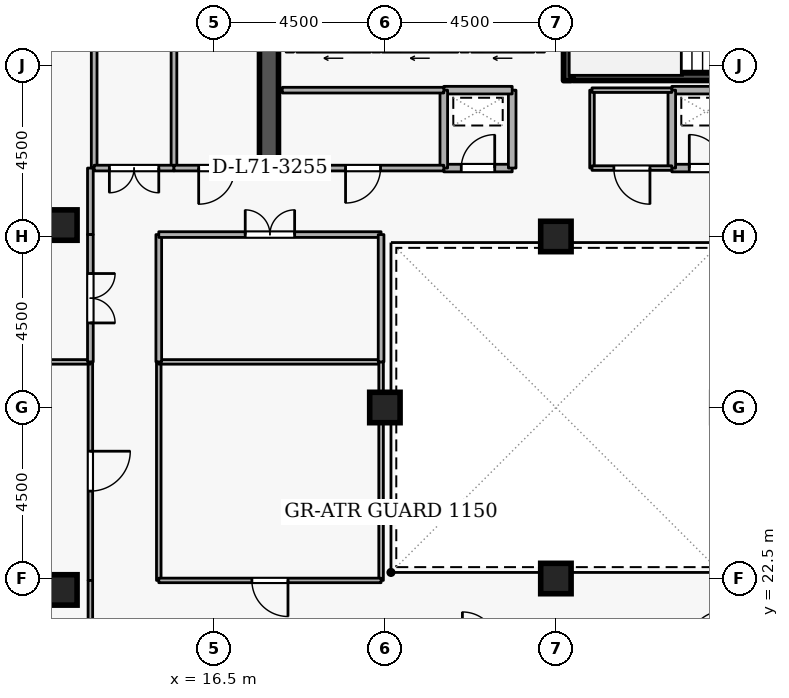
"""IFC4 building model, lengths in metres.
Left out: names, types, materials, properties, quantities, classifications, styles, units other than length and angle.
Written with IfcOpenShell. Run it as: python <this file> out.ifc"""

import sys

from ifc_helpers import new_model, si_unit, direction, frame, frame_2d, origin, origin_2d, place, context, subcontext, project, spatial, rectangle, extrude, element, fill, save


model = new_model("IFC4")
c1 = context("Model", 3, precision=1e-05, world=origin(), true_north=direction((0.0, 1.0)))
c2 = subcontext(c1, "Body", "Model", "MODEL_VIEW")
j1 = project(units=[si_unit("LENGTHUNIT", "METRE"), si_unit("PLANEANGLEUNIT", "RADIAN")], contexts=[c1])
p1 = place(None, origin())
s1 = spatial("IfcSite", under=j1, at=p1, CompositionType="ELEMENT")
p2 = place(p1, origin())
s2 = spatial("IfcBuilding", under=s1, at=p2, CompositionType="ELEMENT")
p3 = place(p2, frame((0.0, 0.0, 265.5)))
s3 = spatial("IfcBuildingStorey", under=s2, at=p3, CompositionType="ELEMENT", Elevation=265.5)
p4 = place(p3, frame((17.95, 33.1, 0.0), z_axis=(0.0, 0.0, 1.0), x_axis=(0.0, 1.0, 0.0)))
e1 = element("IfcWall", 1, at=p4, inside=s3, PredefinedType="SHEAR", context=c2, shape_type="SweptSolid", body=[
    extrude(rectangle(XDim=5.8, YDim=0.5, at=frame_2d((2.9, 0.0))), origin(), (0.0, 0.0, 1.0), 3.6),
])
for number, where, z_axis, x_axis in (
    (2, (12.5, 22.2, 0.0), (0.0, 0.0, 1.0), (1.0, 0.0, 0.0)),
    (3, (12.5, 31.8, 0.0), (0.0, 0.0, 1.0), (1.0, 0.0, 0.0)),
    (4, (25.5, 22.5, 0.0), (0.0, 0.0, 1.0), (1.0, 0.0, 0.0)),
    (5, (25.5, 31.5, 0.0), (0.0, 0.0, 1.0), (1.0, 0.0, 0.0)),
    (6, (21.0, 27.0, 0.0), (0.0, 0.0, 1.0), (1.0, 0.0, 0.0)),
):
    element("IfcColumn", number, at=place(p3, frame(where, z_axis=z_axis, x_axis=x_axis)), inside=s3, PredefinedType="COLUMN", context=c2, shape_type="SweptSolid", body=[
        extrude(rectangle(XDim=0.8, YDim=0.8, at=origin_2d()), origin(), (0.0, 0.0, 1.0), 3.6),
    ])
p5 = place(p3, frame((24.92, 36.45, 0.0), z_axis=(0.0, 0.0, 1.0), x_axis=(-1.0, 0.0, 0.0)))
e7 = element("IfcWall", 7, at=p5, inside=s3, PredefinedType="STANDARD", context=c2, shape_type="SweptSolid", body=[
    extrude(rectangle(XDim=1.64, YDim=0.2, at=frame_2d((0.82, 0.0))), origin(), (0.0, 0.0, 1.0), 3.34),
])
p6 = place(p5, frame((0.31, 0.0, 0.0)))
e8 = element("IfcOpeningElement", 8, at=p6, cuts=e7, PredefinedType="OPENING", context=c2, shape_type="SweptSolid", body=[
    extrude(rectangle(XDim=1.02, YDim=2.06, at=frame_2d((0.51, 1.03))), frame((0.0, 0.11, 0.0), z_axis=(0.0, -1.0, 0.0), x_axis=(1.0, 0.0, 0.0)), (0.0, 0.0, 1.0), 0.22),
])
p7 = place(p3, frame((22.92, 36.45, 0.0), z_axis=(0.0, 0.0, 1.0), x_axis=(-1.0, 0.0, 0.0)))
e9 = element("IfcWall", 9, at=p7, inside=s3, PredefinedType="STANDARD", context=c2, shape_type="SweptSolid", body=[
    extrude(rectangle(XDim=1.99, YDim=0.2, at=frame_2d((0.995, 0.0))), origin(), (0.0, 0.0, 1.0), 3.34),
])
p8 = place(p7, frame((0.485, 0.0, 0.0)))
e10 = element("IfcOpeningElement", 10, at=p8, cuts=e9, PredefinedType="OPENING", context=c2, shape_type="SweptSolid", body=[
    extrude(rectangle(XDim=1.02, YDim=2.06, at=frame_2d((0.51, 1.03))), frame((0.0, 0.11, 0.0), z_axis=(0.0, -1.0, 0.0), x_axis=(1.0, 0.0, 0.0)), (0.0, 0.0, 1.0), 0.22),
])
p9 = place(p3, frame((20.62, 36.45, 0.0), z_axis=(0.0, 0.0, 1.0), x_axis=(-1.0, 0.0, 0.0)))
e11 = element("IfcWall", 11, at=p9, inside=s3, PredefinedType="STANDARD", context=c2, shape_type="SweptSolid", body=[
    extrude(rectangle(XDim=1.94, YDim=0.2, at=frame_2d((0.97, 0.0))), origin(), (0.0, 0.0, 1.0), 3.34),
])
p10 = place(p9, frame((0.46, 0.0, 0.0)))
e12 = element("IfcOpeningElement", 12, at=p10, cuts=e11, PredefinedType="OPENING", context=c2, shape_type="SweptSolid", body=[
    extrude(rectangle(XDim=1.02, YDim=2.06, at=frame_2d((0.51, 1.03))), frame((0.0, 0.11, 0.0), z_axis=(0.0, -1.0, 0.0), x_axis=(1.0, 0.0, 0.0)), (0.0, 0.0, 1.0), 0.22),
])
p11 = place(p3, frame((25.8, 35.6, 0.0), z_axis=(0.0, 0.0, 1.0), x_axis=(0.0, 1.0, 0.0)))
e13 = element("IfcWall", 13, at=p11, inside=s3, PredefinedType="SHEAR", context=c2, shape_type="SweptSolid", body=[
    extrude(rectangle(XDim=3.35, YDim=0.2, at=frame_2d((1.675, 0.0))), origin(), (0.0, 0.0, 1.0), 3.6),
])
p12 = place(p3, frame((25.95, 35.703, 0.0), z_axis=(0.0, 0.0, 1.0), x_axis=(1.0, 0.0, 0.0)))
e14 = element("IfcWall", 14, at=p12, inside=s3, PredefinedType="SHEAR", context=c2, shape_type="SweptSolid", body=[
    extrude(rectangle(XDim=7.1, YDim=0.2, at=frame_2d((3.55, 0.0))), origin(), (0.0, 0.0, 1.0), 3.6),
])
p13 = place(p3, frame((22.55, 33.3, 0.0), z_axis=(0.0, 0.0, 1.0), x_axis=(1.0, 0.0, 0.0)))
e15 = element("IfcWall", 15, at=p13, inside=s3, PredefinedType="STANDARD", context=c2, shape_type="SweptSolid", body=[
    extrude(rectangle(XDim=1.8, YDim=0.2, at=frame_2d((0.9, 0.0))), origin(), (0.0, 0.0, 1.0), 3.34),
])
p14 = place(p13, frame((0.46, 0.0, 0.0)))
e16 = element("IfcOpeningElement", 16, at=p14, cuts=e15, PredefinedType="OPENING", context=c2, shape_type="SweptSolid", body=[
    extrude(rectangle(XDim=0.88, YDim=2.04, at=frame_2d((0.44, 1.02))), frame((0.0, 0.11, 0.0), z_axis=(0.0, -1.0, 0.0), x_axis=(1.0, 0.0, 0.0)), (0.0, 0.0, 1.0), 0.22),
])
p15 = place(p3, frame((24.35, 33.3, 0.0), z_axis=(0.0, 0.0, 1.0), x_axis=(0.0, 1.0, 0.0)))
e17 = element("IfcWall", 17, at=p15, inside=s3, PredefinedType="STANDARD", context=c2, shape_type="SweptSolid", body=[
    extrude(rectangle(XDim=2.05, YDim=0.2, at=frame_2d((1.025, 0.0))), origin(), (0.0, 0.0, 1.0), 3.34),
])
p16 = place(p3, frame((24.35, 35.35, 0.0), z_axis=(0.0, 0.0, 1.0), x_axis=(-1.0, 0.0, 0.0)))
e18 = element("IfcWall", 18, at=p16, inside=s3, PredefinedType="STANDARD", context=c2, shape_type="SweptSolid", body=[
    extrude(rectangle(XDim=1.8, YDim=0.2, at=frame_2d((0.9, 0.0))), origin(), (0.0, 0.0, 1.0), 3.34),
])
p17 = place(p3, frame((22.55, 35.35, 0.0), z_axis=(0.0, 0.0, 1.0), x_axis=(0.0, -1.0, 0.0)))
e19 = element("IfcWall", 19, at=p17, inside=s3, PredefinedType="STANDARD", context=c2, shape_type="SweptSolid", body=[
    extrude(rectangle(XDim=2.05, YDim=0.2, at=frame_2d((1.025, 0.0))), origin(), (0.0, 0.0, 1.0), 3.34),
])
p18 = place(p3, frame((28.55, 33.3, 0.0), z_axis=(0.0, 0.0, 1.0), x_axis=(1.0, 0.0, 0.0)))
e20 = element("IfcWall", 20, at=p18, inside=s3, PredefinedType="STANDARD", context=c2, shape_type="SweptSolid", body=[
    extrude(rectangle(XDim=1.8, YDim=0.2, at=frame_2d((0.9, 0.0))), origin(), (0.0, 0.0, 1.0), 3.34),
])
p19 = place(p18, frame((0.46, 0.0, 0.0)))
e21 = element("IfcOpeningElement", 21, at=p19, cuts=e20, PredefinedType="OPENING", context=c2, shape_type="SweptSolid", body=[
    extrude(rectangle(XDim=0.88, YDim=2.04, at=frame_2d((0.44, 1.02))), frame((0.0, 0.11, 0.0), z_axis=(0.0, -1.0, 0.0), x_axis=(1.0, 0.0, 0.0)), (0.0, 0.0, 1.0), 0.22),
])
p20 = place(p3, frame((30.35, 35.35, 0.0), z_axis=(0.0, 0.0, 1.0), x_axis=(-1.0, 0.0, 0.0)))
e22 = element("IfcWall", 22, at=p20, inside=s3, PredefinedType="STANDARD", context=c2, shape_type="SweptSolid", body=[
    extrude(rectangle(XDim=1.8, YDim=0.2, at=frame_2d((0.9, 0.0))), origin(), (0.0, 0.0, 1.0), 3.34),
])
p21 = place(p3, frame((28.55, 35.35, 0.0), z_axis=(0.0, 0.0, 1.0), x_axis=(0.0, -1.0, 0.0)))
e23 = element("IfcWall", 23, at=p21, inside=s3, PredefinedType="STANDARD", context=c2, shape_type="SweptSolid", body=[
    extrude(rectangle(XDim=2.05, YDim=0.2, at=frame_2d((1.025, 0.0))), origin(), (0.0, 0.0, 1.0), 3.34),
])
p22 = place(p3, frame((18.3, 35.35, 0.0), z_axis=(0.0, 0.0, 1.0), x_axis=(1.0, 0.0, 0.0)))
e24 = element("IfcWall", 24, at=p22, inside=s3, PredefinedType="PARTITIONING", context=c2, shape_type="SweptSolid", body=[
    extrude(rectangle(XDim=4.25, YDim=0.15, at=frame_2d((2.125, 0.0))), origin(), (0.0, 0.0, 1.0), 3.34),
])
p23 = place(p3, frame((22.55, 33.3, 0.0), z_axis=(0.0, 0.0, 1.0), x_axis=(-1.0, 0.0, 0.0)))
e25 = element("IfcWall", 25, at=p23, inside=s3, PredefinedType="PARTITIONING", context=c2, shape_type="SweptSolid", body=[
    extrude(rectangle(XDim=4.25, YDim=0.15, at=frame_2d((2.125, 0.0))), origin(), (0.0, 0.0, 1.0), 3.34),
])
p24 = place(p23, frame((1.665, 0.0, 0.0)))
e26 = element("IfcOpeningElement", 26, at=p24, cuts=e25, PredefinedType="OPENING", context=c2, shape_type="SweptSolid", body=[
    extrude(rectangle(XDim=0.92, YDim=2.08, at=frame_2d((0.46, 1.04))), frame((0.0, 0.085, 0.0), z_axis=(0.0, -1.0, 0.0), x_axis=(1.0, 0.0, 0.0)), (0.0, 0.0, 1.0), 0.17),
])
p25 = place(p3, frame((26.45, 33.3, 0.0), z_axis=(0.0, 0.0, 1.0), x_axis=(0.0, 1.0, 0.0)))
e27 = element("IfcWall", 27, at=p25, inside=s3, PredefinedType="PARTITIONING", context=c2, shape_type="SweptSolid", body=[
    extrude(rectangle(XDim=2.05, YDim=0.12, at=frame_2d((1.025, 0.0))), origin(), (0.0, 0.0, 1.0), 3.34),
])
p26 = place(p3, frame((26.45, 35.35, 0.0), z_axis=(0.0, 0.0, 1.0), x_axis=(1.0, 0.0, 0.0)))
e28 = element("IfcWall", 28, at=p26, inside=s3, PredefinedType="PARTITIONING", context=c2, shape_type="SweptSolid", body=[
    extrude(rectangle(XDim=2.1, YDim=0.12, at=frame_2d((1.05, 0.0))), origin(), (0.0, 0.0, 1.0), 3.34),
])
p27 = place(p3, frame((28.55, 33.3, 0.0), z_axis=(0.0, 0.0, 1.0), x_axis=(-1.0, 0.0, 0.0)))
e29 = element("IfcWall", 29, at=p27, inside=s3, PredefinedType="PARTITIONING", context=c2, shape_type="SweptSolid", body=[
    extrude(rectangle(XDim=2.1, YDim=0.12, at=frame_2d((1.05, 0.0))), origin(), (0.0, 0.0, 1.0), 3.34),
])
p28 = place(p27, frame((0.575, 0.0, 0.0)))
e30 = element("IfcOpeningElement", 30, at=p28, cuts=e29, PredefinedType="OPENING", context=c2, shape_type="SweptSolid", body=[
    extrude(rectangle(XDim=0.95, YDim=2.1, at=frame_2d((0.475, 1.05))), frame((0.0, 0.07, 0.0), z_axis=(0.0, -1.0, 0.0), x_axis=(1.0, 0.0, 0.0)), (0.0, 0.0, 1.0), 0.14),
])
for number, where, z_axis, x_axis in (
    (31, (13.35, 33.3, 0.0), (0.0, 0.0, 1.0), (0.0, 1.0, 0.0)),
    (32, (15.45, 44.72, 0.0), (0.0, 0.0, 1.0), (0.0, -1.0, 0.0)),
):
    element("IfcWall", number, at=place(p3, frame(where, z_axis=z_axis, x_axis=x_axis)), inside=s3, PredefinedType="PARTITIONING", context=c2, shape_type="SweptSolid", body=[
        extrude(rectangle(XDim=11.42, YDim=0.15, at=frame_2d((5.71, 0.0))), origin(), (0.0, 0.0, 1.0), 3.34),
    ])
p29 = place(p3, frame((15.45, 33.3, 0.0), z_axis=(0.0, 0.0, 1.0), x_axis=(-1.0, 0.0, 0.0)))
e33 = element("IfcWall", 33, at=p29, inside=s3, PredefinedType="PARTITIONING", context=c2, shape_type="SweptSolid", body=[
    extrude(rectangle(XDim=2.1, YDim=0.15, at=frame_2d((1.05, 0.0))), origin(), (0.0, 0.0, 1.0), 3.34),
])
p30 = place(p29, frame((0.4, 0.0, 0.0)))
e34 = element("IfcOpeningElement", 34, at=p30, cuts=e33, PredefinedType="OPENING", context=c2, shape_type="SweptSolid", body=[
    extrude(rectangle(XDim=1.3, YDim=2.12, at=frame_2d((0.65, 1.06))), frame((0.0, 0.085, 0.0), z_axis=(0.0, -1.0, 0.0), x_axis=(1.0, 0.0, 0.0)), (0.0, 0.0, 1.0), 0.17),
])
p31 = place(p3, frame((17.7, 33.3, 0.0), z_axis=(0.0, 0.0, 1.0), x_axis=(-1.0, 0.0, 0.0)))
e35 = element("IfcWall", 35, at=p31, inside=s3, PredefinedType="PARTITIONING", context=c2, shape_type="SweptSolid", body=[
    extrude(rectangle(XDim=2.25, YDim=0.15, at=frame_2d((1.125, 0.0))), origin(), (0.0, 0.0, 1.0), 3.34),
])
p32 = place(p31, frame((0.65, 0.0, 0.0)))
e36 = element("IfcOpeningElement", 36, at=p32, cuts=e35, PredefinedType="OPENING", context=c2, shape_type="SweptSolid", body=[
    extrude(rectangle(XDim=0.95, YDim=2.1, at=frame_2d((0.475, 1.05))), frame((0.0, 0.085, 0.0), z_axis=(0.0, -1.0, 0.0), x_axis=(1.0, 0.0, 0.0)), (0.0, 0.0, 1.0), 0.17),
])
p33 = place(p3, frame((13.25, 28.2, 0.0), z_axis=(0.0, 0.0, 1.0), x_axis=(0.0, -1.0, 0.0)))
e37 = element("IfcWall", 37, at=p33, inside=s3, PredefinedType="PARTITIONING", context=c2, shape_type="SweptSolid", body=[
    extrude(rectangle(XDim=5.75, YDim=0.12, at=frame_2d((2.875, 0.0))), origin(), (0.0, 0.0, 1.0), 3.34),
])
p34 = place(p33, frame((2.35, 0.0, 0.0)))
e38 = element("IfcOpeningElement", 38, at=p34, cuts=e37, PredefinedType="OPENING", context=c2, shape_type="SweptSolid", body=[
    extrude(rectangle(XDim=1.05, YDim=2.1, at=frame_2d((0.525, 1.05))), frame((0.0, 0.07, 0.0), z_axis=(0.0, -1.0, 0.0), x_axis=(1.0, 0.0, 0.0)), (0.0, 0.0, 1.0), 0.14),
])
p35 = place(p3, frame((13.25, 22.45, 0.0), z_axis=(0.0, 0.0, 1.0), x_axis=(0.0, -1.0, 0.0)))
e39 = element("IfcWall", 39, at=p35, inside=s3, PredefinedType="PARTITIONING", context=c2, shape_type="SweptSolid", body=[
    extrude(rectangle(XDim=1.75, YDim=0.12, at=frame_2d((0.875, 0.0))), origin(), (0.0, 0.0, 1.0), 3.34),
])
p36 = place(p3, frame((7.78, 28.2, 0.0), z_axis=(0.0, 0.0, 1.0), x_axis=(1.0, 0.0, 0.0)))
e40 = element("IfcWall", 40, at=p36, inside=s3, PredefinedType="PARTITIONING", context=c2, shape_type="SweptSolid", body=[
    extrude(rectangle(XDim=5.47, YDim=0.12, at=frame_2d((2.735, 0.0))), origin(), (0.0, 0.0, 1.0), 3.34),
])
p37 = place(p3, frame((13.25, 33.3, 0.0), z_axis=(0.0, 0.0, 1.0), x_axis=(0.0, -1.0, 0.0)))
e41 = element("IfcWall", 41, at=p37, inside=s3, PredefinedType="PARTITIONING", context=c2, shape_type="SweptSolid", body=[
    extrude(rectangle(XDim=1.75, YDim=0.15, at=frame_2d((0.875, 0.0))), origin(), (0.0, 0.0, 1.0), 3.34),
])
p38 = place(p3, frame((13.25, 31.55, 0.0), z_axis=(0.0, 0.0, 1.0), x_axis=(0.0, -1.0, 0.0)))
e42 = element("IfcWall", 42, at=p38, inside=s3, PredefinedType="PARTITIONING", context=c2, shape_type="SweptSolid", body=[
    extrude(rectangle(XDim=3.35, YDim=0.15, at=frame_2d((1.675, 0.0))), origin(), (0.0, 0.0, 1.0), 3.34),
])
p39 = place(p38, frame((1.025, 0.0, 0.0)))
e43 = element("IfcOpeningElement", 43, at=p39, cuts=e42, PredefinedType="OPENING", context=c2, shape_type="SweptSolid", body=[
    extrude(rectangle(XDim=1.3, YDim=2.12, at=frame_2d((0.65, 1.06))), frame((0.0, 0.085, 0.0), z_axis=(0.0, -1.0, 0.0), x_axis=(1.0, 0.0, 0.0)), (0.0, 0.0, 1.0), 0.17),
])
p40 = place(p3, frame((15.05, 22.45, 0.0), z_axis=(0.0, 0.0, 1.0), x_axis=(0.0, 1.0, 0.0)))
e44 = element("IfcWall", 44, at=p40, inside=s3, PredefinedType="PARTITIONING", context=c2, shape_type="SweptSolid", body=[
    extrude(rectangle(XDim=5.75, YDim=0.12, at=frame_2d((2.875, 0.0))), origin(), (0.0, 0.0, 1.0), 3.34),
])
p41 = place(p3, frame((15.05, 28.2, 0.0), z_axis=(0.0, 0.0, 1.0), x_axis=(1.0, 0.0, 0.0)))
e45 = element("IfcWall", 45, at=p41, inside=s3, PredefinedType="PARTITIONING", context=c2, shape_type="SweptSolid", body=[
    extrude(rectangle(XDim=5.85, YDim=0.12, at=frame_2d((2.925, 0.0))), origin(), (0.0, 0.0, 1.0), 3.34),
])
p42 = place(p3, frame((20.9, 28.2, 0.0), z_axis=(0.0, 0.0, 1.0), x_axis=(0.0, -1.0, 0.0)))
e46 = element("IfcWall", 46, at=p42, inside=s3, PredefinedType="PARTITIONING", context=c2, shape_type="SweptSolid", body=[
    extrude(rectangle(XDim=5.75, YDim=0.12, at=frame_2d((2.875, 0.0))), origin(), (0.0, 0.0, 1.0), 3.34),
])
p43 = place(p3, frame((20.9, 22.45, 0.0), z_axis=(0.0, 0.0, 1.0), x_axis=(-1.0, 0.0, 0.0)))
e47 = element("IfcWall", 47, at=p43, inside=s3, PredefinedType="PARTITIONING", context=c2, shape_type="SweptSolid", body=[
    extrude(rectangle(XDim=5.85, YDim=0.12, at=frame_2d((2.925, 0.0))), origin(), (0.0, 0.0, 1.0), 3.34),
])
p44 = place(p43, frame((2.45, 0.0, 0.0)))
e48 = element("IfcOpeningElement", 48, at=p44, cuts=e47, PredefinedType="OPENING", context=c2, shape_type="SweptSolid", body=[
    extrude(rectangle(XDim=0.95, YDim=2.1, at=frame_2d((0.475, 1.05))), frame((0.0, 0.07, 0.0), z_axis=(0.0, -1.0, 0.0), x_axis=(1.0, 0.0, 0.0)), (0.0, 0.0, 1.0), 0.14),
])
p45 = place(p3, frame((15.05, 28.2, 0.0), z_axis=(0.0, 0.0, 1.0), x_axis=(0.0, 1.0, 0.0)))
e49 = element("IfcWall", 49, at=p45, inside=s3, PredefinedType="PARTITIONING", context=c2, shape_type="SweptSolid", body=[
    extrude(rectangle(XDim=3.35, YDim=0.15, at=frame_2d((1.675, 0.0))), origin(), (0.0, 0.0, 1.0), 3.34),
])
p46 = place(p3, frame((15.05, 31.55, 0.0), z_axis=(0.0, 0.0, 1.0), x_axis=(1.0, 0.0, 0.0)))
e50 = element("IfcWall", 50, at=p46, inside=s3, PredefinedType="PARTITIONING", context=c2, shape_type="SweptSolid", body=[
    extrude(rectangle(XDim=5.85, YDim=0.15, at=frame_2d((2.925, 0.0))), origin(), (0.0, 0.0, 1.0), 3.34),
])
p47 = place(p46, frame((2.275, 0.0, 0.0)))
e51 = element("IfcOpeningElement", 51, at=p47, cuts=e50, PredefinedType="OPENING", context=c2, shape_type="SweptSolid", body=[
    extrude(rectangle(XDim=1.3, YDim=2.12, at=frame_2d((0.65, 1.06))), frame((0.0, 0.085, 0.0), z_axis=(0.0, -1.0, 0.0), x_axis=(1.0, 0.0, 0.0)), (0.0, 0.0, 1.0), 0.17),
])
p48 = place(p3, frame((20.9, 31.55, 0.0), z_axis=(0.0, 0.0, 1.0), x_axis=(0.0, -1.0, 0.0)))
e52 = element("IfcWall", 52, at=p48, inside=s3, PredefinedType="PARTITIONING", context=c2, shape_type="SweptSolid", body=[
    extrude(rectangle(XDim=3.35, YDim=0.15, at=frame_2d((1.675, 0.0))), origin(), (0.0, 0.0, 1.0), 3.34),
])
p49 = place(p14, origin())
e53 = element("IfcDoor", 53, at=p49, inside=s3, OperationType="SINGLE_SWING_RIGHT", PredefinedType="DOOR", context=c2, shape_type="SweptSolid", body=[
    extrude(rectangle(XDim=0.88, YDim=2.04, at=frame_2d((0.44, 1.02))), frame((0.0, 0.025, 0.0), z_axis=(0.0, -1.0, 0.0), x_axis=(1.0, 0.0, 0.0)), (0.0, 0.0, 1.0), 0.05),
])
fill(e16, e53)
p50 = place(p19, origin())
e54 = element("IfcDoor", 54, at=p50, inside=s3, OperationType="SINGLE_SWING_LEFT", PredefinedType="DOOR", context=c2, shape_type="SweptSolid", body=[
    extrude(rectangle(XDim=0.88, YDim=2.04, at=frame_2d((0.44, 1.02))), frame((0.0, 0.025, 0.0), z_axis=(0.0, -1.0, 0.0), x_axis=(1.0, 0.0, 0.0)), (0.0, 0.0, 1.0), 0.05),
])
fill(e21, e54)
p51 = place(p24, origin())
e55 = element("IfcDoor", 55, at=p51, inside=s3, OperationType="SINGLE_SWING_RIGHT", PredefinedType="DOOR", context=c2, shape_type="SweptSolid", body=[
    extrude(rectangle(XDim=0.92, YDim=2.08, at=frame_2d((0.46, 1.04))), frame((0.0, 0.025, 0.0), z_axis=(0.0, -1.0, 0.0), x_axis=(1.0, 0.0, 0.0)), (0.0, 0.0, 1.0), 0.05),
])
fill(e26, e55)
p52 = place(p28, origin())
e56 = element("IfcDoor", 56, at=p52, inside=s3, OperationType="SINGLE_SWING_LEFT", PredefinedType="DOOR", context=c2, shape_type="SweptSolid", body=[
    extrude(rectangle(XDim=0.95, YDim=2.1, at=frame_2d((0.475, 1.05))), frame((0.0, 0.025, 0.0), z_axis=(0.0, -1.0, 0.0), x_axis=(1.0, 0.0, 0.0)), (0.0, 0.0, 1.0), 0.05),
])
fill(e30, e56)
p53 = place(p30, origin())
e57 = element("IfcDoor", 57, at=p53, inside=s3, OperationType="DOUBLE_DOOR_SINGLE_SWING", PredefinedType="DOOR", context=c2, shape_type="SweptSolid", body=[
    extrude(rectangle(XDim=1.3, YDim=2.12, at=frame_2d((0.65, 1.06))), frame((0.0, 0.025, 0.0), z_axis=(0.0, -1.0, 0.0), x_axis=(1.0, 0.0, 0.0)), (0.0, 0.0, 1.0), 0.05),
])
fill(e34, e57)
p54 = place(p32, origin())
e58 = element("IfcDoor", 58, at=p54, inside=s3, OperationType="SINGLE_SWING_RIGHT", PredefinedType="DOOR", context=c2, shape_type="SweptSolid", body=[
    extrude(rectangle(XDim=0.95, YDim=2.1, at=frame_2d((0.475, 1.05))), frame((0.0, 0.025, 0.0), z_axis=(0.0, -1.0, 0.0), x_axis=(1.0, 0.0, 0.0)), (0.0, 0.0, 1.0), 0.05),
])
fill(e36, e58)
p55 = place(p34, origin())
e59 = element("IfcDoor", 59, at=p55, inside=s3, OperationType="SINGLE_SWING_LEFT", PredefinedType="DOOR", context=c2, shape_type="SweptSolid", body=[
    extrude(rectangle(XDim=1.05, YDim=2.1, at=frame_2d((0.525, 1.05))), frame((0.0, 0.025, 0.0), z_axis=(0.0, -1.0, 0.0), x_axis=(1.0, 0.0, 0.0)), (0.0, 0.0, 1.0), 0.05),
])
fill(e38, e59)
p56 = place(p39, origin())
e60 = element("IfcDoor", 60, at=p56, inside=s3, OperationType="DOUBLE_DOOR_SINGLE_SWING", PredefinedType="DOOR", context=c2, shape_type="SweptSolid", body=[
    extrude(rectangle(XDim=1.3, YDim=2.12, at=frame_2d((0.65, 1.06))), frame((0.0, 0.025, 0.0), z_axis=(0.0, -1.0, 0.0), x_axis=(1.0, 0.0, 0.0)), (0.0, 0.0, 1.0), 0.05),
])
fill(e43, e60)
p57 = place(p44, origin())
e61 = element("IfcDoor", 61, at=p57, inside=s3, OperationType="SINGLE_SWING_LEFT", PredefinedType="DOOR", context=c2, shape_type="SweptSolid", body=[
    extrude(rectangle(XDim=0.95, YDim=2.1, at=frame_2d((0.475, 1.05))), frame((0.0, 0.025, 0.0), z_axis=(0.0, -1.0, 0.0), x_axis=(1.0, 0.0, 0.0)), (0.0, 0.0, 1.0), 0.05),
])
fill(e48, e61)
p58 = place(p47, origin())
e62 = element("IfcDoor", 62, at=p58, inside=s3, OperationType="DOUBLE_DOOR_SINGLE_SWING", PredefinedType="DOOR", context=c2, shape_type="SweptSolid", body=[
    extrude(rectangle(XDim=1.3, YDim=2.12, at=frame_2d((0.65, 1.06))), frame((0.0, 0.025, 0.0), z_axis=(0.0, -1.0, 0.0), x_axis=(1.0, 0.0, 0.0)), (0.0, 0.0, 1.0), 0.05),
])
fill(e51, e62)
save(model, sys.argv[1])
